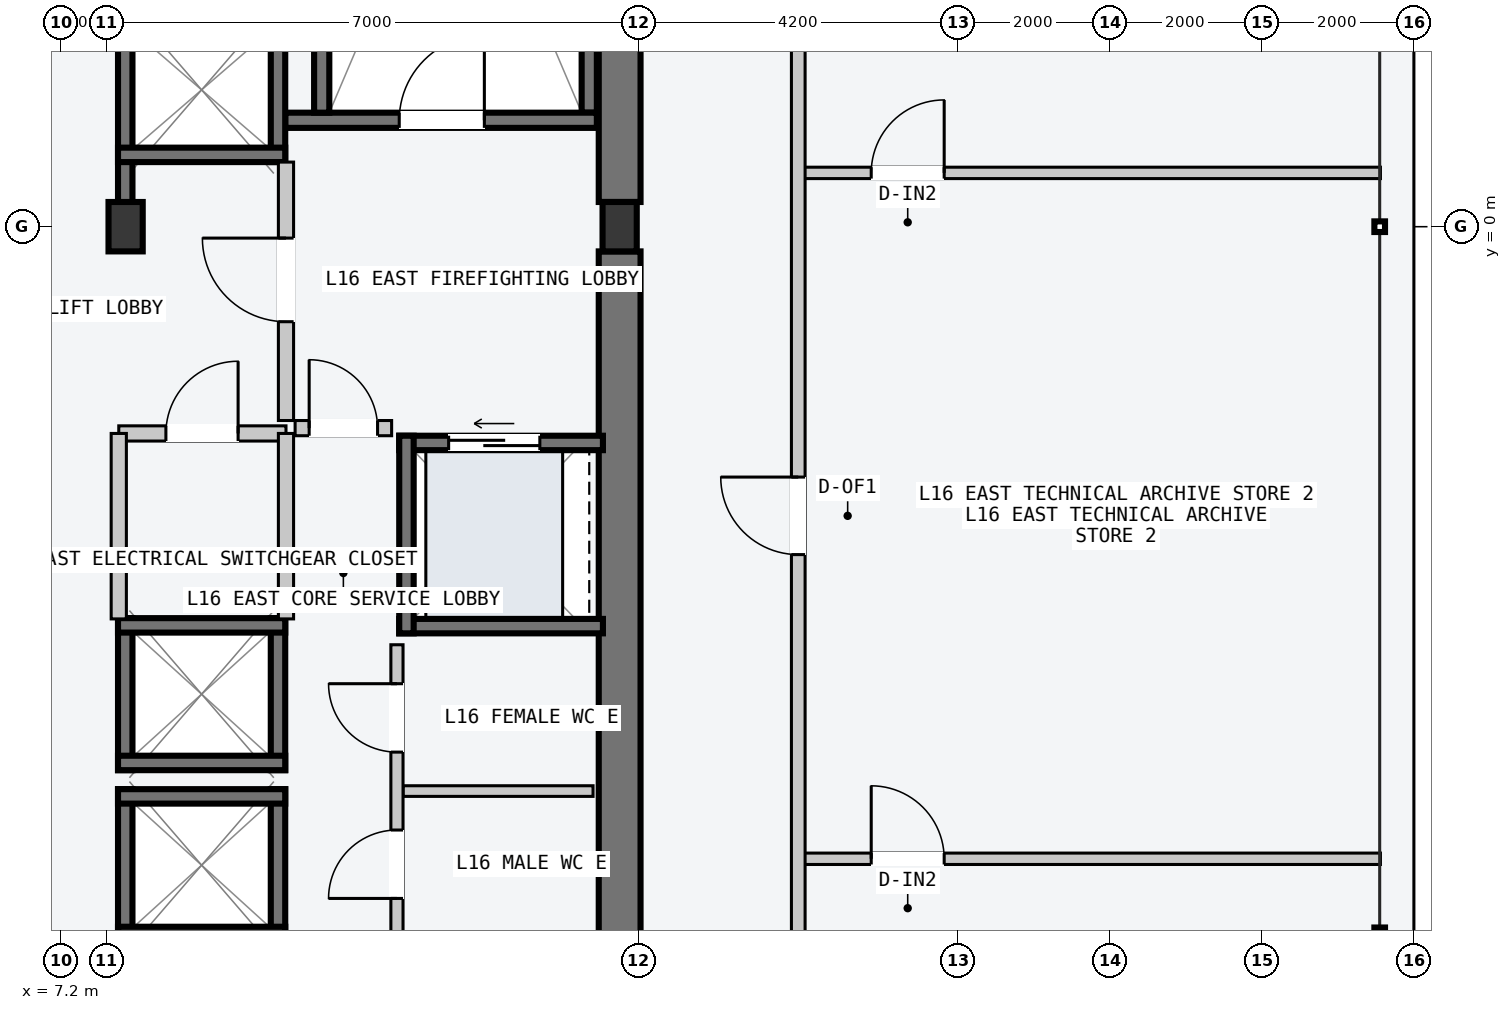
"""IFC4 building model, lengths in metres.
Left out: names, types, materials, properties, quantities, classifications, styles, units other than length and angle.
Written with IfcOpenShell. Run it as: python <this file> out.ifc"""

import sys

from ifc_helpers import new_model, si_unit, direction, frame, frame_2d, origin, origin_2d, place, context, subcontext, project, spatial, rectangle, i_section, extrude, element, fill, save


model = new_model("IFC4")
c1 = context("Model", 3, precision=1e-05, world=origin(), true_north=direction((0.0, 1.0)))
c2 = subcontext(c1, "Body", "Model", "MODEL_VIEW")
j1 = project(units=[si_unit("LENGTHUNIT", "METRE"), si_unit("PLANEANGLEUNIT", "RADIAN")], contexts=[c1])
p1 = place(None, origin())
s1 = spatial("IfcSite", under=j1, at=p1, CompositionType="ELEMENT")
p2 = place(p1, origin())
s2 = spatial("IfcBuilding", under=s1, at=p2, CompositionType="ELEMENT")
p3 = place(p2, frame((0.0, 0.0, 63.6)))
s3 = spatial("IfcBuildingStorey", under=s2, at=p3, CompositionType="ELEMENT", Elevation=63.6)
for number, where, z_axis, x_axis in (
    (1, (14.55, -9.425, -0.2), (0.0, 0.0, 1.0), (0.0, 1.0, 0.0)),
    (2, (14.55, 0.325, -0.2), (0.0, 0.0, 1.0), (0.0, 1.0, 0.0)),
):
    element("IfcWall", number, at=place(p3, frame(where, z_axis=z_axis, x_axis=x_axis)), inside=s3, PredefinedType="SHEAR", context=c2, shape_type="SweptSolid", body=[
        extrude(rectangle(XDim=9.1, YDim=0.55, at=frame_2d((4.55, 0.0))), origin(), (0.0, 0.0, 1.0), 3.6),
    ])
p4 = place(p3, frame((14.15, 1.5, -0.2), z_axis=(0.0, 0.0, 1.0), x_axis=(0.0, 1.0, 0.0)))
e3 = element("IfcWall", 3, at=p4, inside=s3, PredefinedType="SOLIDWALL", context=c2, shape_type="SweptSolid", body=[
    extrude(rectangle(XDim=7.8, YDim=0.2, at=frame_2d((3.9, 0.0))), origin(), (0.0, 0.0, 1.0), 3.6),
])
p5 = place(p3, frame((10.15, 1.4, -0.2), z_axis=(0.0, 0.0, 1.0), x_axis=(1.0, 0.0, 0.0)))
e4 = element("IfcWall", 4, at=p5, inside=s3, PredefinedType="SOLIDWALL", context=c2, shape_type="SweptSolid", body=[
    extrude(rectangle(XDim=4.1, YDim=0.2, at=frame_2d((2.05, 0.0))), origin(), (0.0, 0.0, 1.0), 3.6),
])
p6 = place(p5, frame((1.5, 0.0, 0.2)))
e5 = element("IfcOpeningElement", 5, at=p6, cuts=e4, PredefinedType="OPENING", context=c2, shape_type="SweptSolid", body=[
    extrude(rectangle(XDim=1.12, YDim=2.18, at=frame_2d((0.56, 1.09))), frame((0.0, 0.11, 0.0), z_axis=(0.0, -1.0, 0.0), x_axis=(1.0, 0.0, 0.0)), (0.0, 0.0, 1.0), 0.22),
])
p7 = place(p3, frame((10.63, 1.5, -0.2), z_axis=(0.0, 0.0, 1.0), x_axis=(0.0, 1.0, 0.0)))
e6 = element("IfcWall", 6, at=p7, inside=s3, PredefinedType="SOLIDWALL", context=c2, shape_type="SweptSolid", body=[
    extrude(rectangle(XDim=7.8, YDim=0.2, at=frame_2d((3.9, 0.0))), origin(), (0.0, 0.0, 1.0), 3.6),
])
for number, where, z_axis, x_axis in (
    (7, (8.05, 0.0, 0.0), (0.0, 0.0, 1.0), (1.0, 0.0, 0.0)),
    (8, (14.55, 0.0, 0.0), (0.0, 0.0, 1.0), (1.0, 0.0, 0.0)),
):
    element("IfcColumn", number, at=place(p3, frame(where, z_axis=z_axis, x_axis=x_axis)), inside=s3, PredefinedType="COLUMN", context=c2, shape_type="SweptSolid", body=[
        extrude(i_section(OverallWidth=0.45, OverallDepth=0.65, WebThickness=0.025, FlangeThickness=0.04, at=origin_2d()), origin(), (0.0, 0.0, 1.0), 3.6),
    ])
p8 = place(p3, frame((8.045, 0.21, -0.2), z_axis=(0.0, 0.0, 1.0), x_axis=(0.0, 1.0, 0.0)))
e9 = element("IfcWall", 9, at=p8, inside=s3, PredefinedType="SOLIDWALL", context=c2, shape_type="SweptSolid", body=[
    extrude(rectangle(XDim=2.54, YDim=0.19, at=frame_2d((1.27, 0.0))), origin(), (0.0, 0.0, 1.0), 3.6),
])
p9 = place(p3, frame((10.055, 0.85, -0.2), z_axis=(0.0, 0.0, 1.0), x_axis=(0.0, 1.0, 0.0)))
e10 = element("IfcWall", 10, at=p9, inside=s3, PredefinedType="SOLIDWALL", context=c2, shape_type="SweptSolid", body=[
    extrude(rectangle(XDim=1.9, YDim=0.19, at=frame_2d((0.95, 0.0))), origin(), (0.0, 0.0, 1.0), 3.6),
])
p10 = place(p3, frame((7.95, 0.945, -0.2), z_axis=(0.0, 0.0, 1.0), x_axis=(1.0, 0.0, 0.0)))
e11 = element("IfcWall", 11, at=p10, inside=s3, PredefinedType="SOLIDWALL", context=c2, shape_type="SweptSolid", body=[
    extrude(rectangle(XDim=2.2, YDim=0.19, at=frame_2d((1.1, 0.0))), origin(), (0.0, 0.0, 1.0), 3.6),
])
for number, where, z_axis, x_axis in (
    (12, (8.045, -9.52, -0.2), (0.0, 0.0, 1.0), (0.0, 1.0, 0.0)),
    (13, (10.055, -9.52, -0.2), (0.0, 0.0, 1.0), (0.0, 1.0, 0.0)),
):
    element("IfcWall", number, at=place(p3, frame(where, z_axis=z_axis, x_axis=x_axis)), inside=s3, PredefinedType="SOLIDWALL", context=c2, shape_type="SweptSolid", body=[
        extrude(rectangle(XDim=2.12, YDim=0.19, at=frame_2d((1.06, 0.0))), origin(), (0.0, 0.0, 1.0), 3.6),
    ])
for number, where, z_axis, x_axis in (
    (14, (7.95, -7.495, -0.2), (0.0, 0.0, 1.0), (1.0, 0.0, 0.0)),
    (15, (7.95, -9.305, -0.2), (0.0, 0.0, 1.0), (1.0, 0.0, 0.0)),
):
    element("IfcWall", number, at=place(p3, frame(where, z_axis=z_axis, x_axis=x_axis)), inside=s3, PredefinedType="SOLIDWALL", context=c2, shape_type="SweptSolid", body=[
        extrude(rectangle(XDim=2.2, YDim=0.19, at=frame_2d((1.1, 0.0))), origin(), (0.0, 0.0, 1.0), 3.6),
    ])
for number, where, z_axis, x_axis in (
    (16, (8.045, -7.15, -0.2), (0.0, 0.0, 1.0), (0.0, 1.0, 0.0)),
    (17, (10.055, -7.15, -0.2), (0.0, 0.0, 1.0), (0.0, 1.0, 0.0)),
):
    element("IfcWall", number, at=place(p3, frame(where, z_axis=z_axis, x_axis=x_axis)), inside=s3, PredefinedType="SOLIDWALL", context=c2, shape_type="SweptSolid", body=[
        extrude(rectangle(XDim=2.0, YDim=0.19, at=frame_2d((1.0, 0.0))), origin(), (0.0, 0.0, 1.0), 3.6),
    ])
for number, where, z_axis, x_axis in (
    (18, (7.95, -5.245, -0.2), (0.0, 0.0, 1.0), (1.0, 0.0, 0.0)),
    (19, (7.95, -7.055, -0.2), (0.0, 0.0, 1.0), (1.0, 0.0, 0.0)),
):
    element("IfcWall", number, at=place(p3, frame(where, z_axis=z_axis, x_axis=x_axis)), inside=s3, PredefinedType="SOLIDWALL", context=c2, shape_type="SweptSolid", body=[
        extrude(rectangle(XDim=2.2, YDim=0.19, at=frame_2d((1.1, 0.0))), origin(), (0.0, 0.0, 1.0), 3.6),
    ])
p11 = place(p3, frame((11.65, -2.845, -0.2), z_axis=(0.0, 0.0, 1.0), x_axis=(1.0, 0.0, 0.0)))
e20 = element("IfcWall", 20, at=p11, inside=s3, PredefinedType="SOLIDWALL", context=c2, shape_type="SweptSolid", body=[
    extrude(rectangle(XDim=2.68, YDim=0.19, at=frame_2d((1.34, 0.0))), origin(), (0.0, 0.0, 1.0), 3.6),
])
p12 = place(p11, frame((0.65, 0.0, 0.2)))
e21 = element("IfcOpeningElement", 21, at=p12, cuts=e20, PredefinedType="OPENING", context=c2, shape_type="SweptSolid", body=[
    extrude(rectangle(XDim=1.2, YDim=2.2, at=frame_2d((0.6, 1.1))), frame((0.0, 0.105, 0.0), z_axis=(0.0, -1.0, 0.0), x_axis=(1.0, 0.0, 0.0)), (0.0, 0.0, 1.0), 0.21),
])
p13 = place(p3, frame((11.65, -5.255, -0.2), z_axis=(0.0, 0.0, 1.0), x_axis=(1.0, 0.0, 0.0)))
e22 = element("IfcWall", 22, at=p13, inside=s3, PredefinedType="SOLIDWALL", context=c2, shape_type="SweptSolid", body=[
    extrude(rectangle(XDim=2.68, YDim=0.19, at=frame_2d((1.34, 0.0))), origin(), (0.0, 0.0, 1.0), 3.6),
])
p14 = place(p3, frame((11.745, -5.35, -0.2), z_axis=(0.0, 0.0, 1.0), x_axis=(0.0, 1.0, 0.0)))
e23 = element("IfcWall", 23, at=p14, inside=s3, PredefinedType="SOLIDWALL", context=c2, shape_type="SweptSolid", body=[
    extrude(rectangle(XDim=2.6, YDim=0.19, at=frame_2d((1.3, 0.0))), origin(), (0.0, 0.0, 1.0), 3.6),
])
p15 = place(p3, frame((10.16, -2.55, 0.0), z_axis=(0.0, 0.0, 1.0), x_axis=(0.0, 1.0, 0.0)))
e24 = element("IfcWall", 24, at=p15, inside=s3, PredefinedType="PARTITIONING", context=c2, shape_type="SweptSolid", body=[
    extrude(rectangle(XDim=3.4, YDim=0.2, at=frame_2d((1.7, 0.0))), origin(), (0.0, 0.0, 1.0), 3.4),
])
p16 = place(p15, frame((1.3, 0.0, 0.0)))
e25 = element("IfcOpeningElement", 25, at=p16, cuts=e24, PredefinedType="OPENING", context=c2, shape_type="SweptSolid", body=[
    extrude(rectangle(XDim=1.1, YDim=2.15, at=frame_2d((0.55, 1.075))), frame((0.0, 0.11, 0.0), z_axis=(0.0, -1.0, 0.0), x_axis=(1.0, 0.0, 0.0)), (0.0, 0.0, 1.0), 0.22),
])
p17 = place(p3, frame((10.28, -2.65, 0.0), z_axis=(0.0, 0.0, 1.0), x_axis=(1.0, 0.0, 0.0)))
e26 = element("IfcWall", 26, at=p17, inside=s3, PredefinedType="PARTITIONING", context=c2, shape_type="SweptSolid", body=[
    extrude(rectangle(XDim=1.27, YDim=0.2, at=frame_2d((0.635, 0.0))), origin(), (0.0, 0.0, 1.0), 3.4),
])
p18 = place(p17, frame((0.185, 0.0, 0.0)))
e27 = element("IfcOpeningElement", 27, at=p18, cuts=e26, PredefinedType="OPENING", context=c2, shape_type="SweptSolid", body=[
    extrude(rectangle(XDim=0.9, YDim=2.15, at=frame_2d((0.45, 1.075))), frame((0.0, 0.11, 0.0), z_axis=(0.0, -1.0, 0.0), x_axis=(1.0, 0.0, 0.0)), (0.0, 0.0, 1.0), 0.22),
])
p19 = place(p3, frame((7.96, -2.72, 0.0), z_axis=(0.0, 0.0, 1.0), x_axis=(1.0, 0.0, 0.0)))
e28 = element("IfcWall", 28, at=p19, inside=s3, PredefinedType="PARTITIONING", context=c2, shape_type="SweptSolid", body=[
    extrude(rectangle(XDim=2.2, YDim=0.2, at=frame_2d((1.1, 0.0))), origin(), (0.0, 0.0, 1.0), 3.4),
])
p20 = place(p19, frame((0.62, 0.0, 0.0)))
e29 = element("IfcOpeningElement", 29, at=p20, cuts=e28, PredefinedType="OPENING", context=c2, shape_type="SweptSolid", body=[
    extrude(rectangle(XDim=0.95, YDim=2.1, at=frame_2d((0.475, 1.05))), frame((0.0, 0.11, 0.0), z_axis=(0.0, -1.0, 0.0), x_axis=(1.0, 0.0, 0.0)), (0.0, 0.0, 1.0), 0.22),
])
for number, where, z_axis, x_axis in (
    (30, (7.96, -5.16, 0.0), (0.0, 0.0, 1.0), (0.0, 1.0, 0.0)),
    (31, (10.16, -5.16, 0.0), (0.0, 0.0, 1.0), (0.0, 1.0, 0.0)),
):
    element("IfcWall", number, at=place(p3, frame(where, z_axis=z_axis, x_axis=x_axis)), inside=s3, PredefinedType="PARTITIONING", context=c2, shape_type="SweptSolid", body=[
        extrude(rectangle(XDim=2.44, YDim=0.2, at=frame_2d((1.22, 0.0))), origin(), (0.0, 0.0, 1.0), 3.4),
    ])
p21 = place(p3, frame((11.7, -7.425, 0.0), z_axis=(0.0, 0.0, 1.0), x_axis=(1.0, 0.0, 0.0)))
e32 = element("IfcWall", 32, at=p21, inside=s3, PredefinedType="PARTITIONING", context=c2, shape_type="SweptSolid", body=[
    extrude(rectangle(XDim=2.5, YDim=0.14, at=frame_2d((1.25, 0.0))), origin(), (0.0, 0.0, 1.0), 3.4),
])
p22 = place(p3, frame((11.62, -9.35, 0.0), z_axis=(0.0, 0.0, 1.0), x_axis=(0.0, 1.0, 0.0)))
e33 = element("IfcWall", 33, at=p22, inside=s3, PredefinedType="PARTITIONING", context=c2, shape_type="SweptSolid", body=[
    extrude(rectangle(XDim=3.85, YDim=0.16, at=frame_2d((1.925, 0.0))), origin(), (0.0, 0.0, 1.0), 3.4),
])
p23 = place(p22, frame((0.512, 0.0, 0.0)))
e34 = element("IfcOpeningElement", 34, at=p23, cuts=e33, PredefinedType="OPENING", context=c2, shape_type="SweptSolid", body=[
    extrude(rectangle(XDim=0.9, YDim=2.15, at=frame_2d((0.45, 1.075))), frame((0.0, 0.09, 0.0), z_axis=(0.0, -1.0, 0.0), x_axis=(1.0, 0.0, 0.0)), (0.0, 0.0, 1.0), 0.18),
])
p24 = place(p22, frame((2.438, 0.0, 0.0)))
e35 = element("IfcOpeningElement", 35, at=p24, cuts=e33, PredefinedType="OPENING", context=c2, shape_type="SweptSolid", body=[
    extrude(rectangle(XDim=0.9, YDim=2.15, at=frame_2d((0.45, 1.075))), frame((0.0, 0.09, 0.0), z_axis=(0.0, -1.0, 0.0), x_axis=(1.0, 0.0, 0.0)), (0.0, 0.0, 1.0), 0.18),
])
p25 = place(p3, frame((16.96, -8.316, 0.0), z_axis=(0.0, 0.0, 1.0), x_axis=(1.0, 0.0, 0.0)))
e36 = element("IfcWall", 36, at=p25, inside=s3, PredefinedType="PARTITIONING", context=c2, shape_type="SweptSolid", body=[
    extrude(rectangle(XDim=7.6, YDim=0.15, at=frame_2d((3.8, 0.0))), origin(), (0.0, 0.0, 1.0), 3.4),
])
p26 = place(p25, frame((0.9, 0.0, 0.0)))
e37 = element("IfcOpeningElement", 37, at=p26, cuts=e36, PredefinedType="OPENING", context=c2, shape_type="SweptSolid", body=[
    extrude(rectangle(XDim=0.96, YDim=2.18, at=frame_2d((0.48, 1.09))), frame((0.0, 0.085, 0.0), z_axis=(0.0, -1.0, 0.0), x_axis=(1.0, 0.0, 0.0)), (0.0, 0.0, 1.0), 0.17),
])
p27 = place(p3, frame((16.96, 0.708, 0.0), z_axis=(0.0, 0.0, 1.0), x_axis=(1.0, 0.0, 0.0)))
e38 = element("IfcWall", 38, at=p27, inside=s3, PredefinedType="PARTITIONING", context=c2, shape_type="SweptSolid", body=[
    extrude(rectangle(XDim=7.6, YDim=0.15, at=frame_2d((3.8, 0.0))), origin(), (0.0, 0.0, 1.0), 3.4),
])
p28 = place(p27, frame((0.9, 0.0, 0.0)))
e39 = element("IfcOpeningElement", 39, at=p28, cuts=e38, PredefinedType="OPENING", context=c2, shape_type="SweptSolid", body=[
    extrude(rectangle(XDim=0.96, YDim=2.18, at=frame_2d((0.48, 1.09))), frame((0.0, 0.085, 0.0), z_axis=(0.0, -1.0, 0.0), x_axis=(1.0, 0.0, 0.0)), (0.0, 0.0, 1.0), 0.17),
])
p29 = place(p3, frame((16.9, -14.42, 0.0), z_axis=(0.0, 0.0, 1.0), x_axis=(0.0, 1.0, 0.0)))
e40 = element("IfcWall", 40, at=p29, inside=s3, PredefinedType="PARTITIONING", context=c2, shape_type="SweptSolid", body=[
    extrude(rectangle(XDim=26.54, YDim=0.18, at=frame_2d((13.27, 0.0))), origin(), (0.0, 0.0, 1.0), 3.4),
])
p30 = place(p29, frame((2.572, 0.0, 0.0)))
e41 = element("IfcOpeningElement", 41, at=p30, cuts=e40, PredefinedType="OPENING", context=c2, shape_type="SweptSolid", body=[
    extrude(rectangle(XDim=0.96, YDim=2.18, at=frame_2d((0.48, 1.09))), frame((0.0, 0.1, 0.0), z_axis=(0.0, -1.0, 0.0), x_axis=(1.0, 0.0, 0.0)), (0.0, 0.0, 1.0), 0.2),
])
p31 = place(p29, frame((10.106, 0.0, 0.0)))
e42 = element("IfcOpeningElement", 42, at=p31, cuts=e40, PredefinedType="OPENING", context=c2, shape_type="SweptSolid", body=[
    extrude(rectangle(XDim=1.02, YDim=2.2, at=frame_2d((0.51, 1.1))), frame((0.0, 0.1, 0.0), z_axis=(0.0, -1.0, 0.0), x_axis=(1.0, 0.0, 0.0)), (0.0, 0.0, 1.0), 0.2),
])
p32 = place(p29, frame((20.304, 0.0, 0.0)))
e43 = element("IfcOpeningElement", 43, at=p32, cuts=e40, PredefinedType="OPENING", context=c2, shape_type="SweptSolid", body=[
    extrude(rectangle(XDim=1.06, YDim=2.2, at=frame_2d((0.53, 1.1))), frame((0.0, 0.1, 0.0), z_axis=(0.0, -1.0, 0.0), x_axis=(1.0, 0.0, 0.0)), (0.0, 0.0, 1.0), 0.2),
])
p33 = place(p6, origin())
e44 = element("IfcDoor", 44, at=p33, inside=s3, OperationType="SINGLE_SWING_RIGHT", PredefinedType="DOOR", context=c2, shape_type="SweptSolid", body=[
    extrude(rectangle(XDim=1.12, YDim=2.18, at=frame_2d((0.56, 1.09))), frame((0.0, 0.025, 0.0), z_axis=(0.0, -1.0, 0.0), x_axis=(1.0, 0.0, 0.0)), (0.0, 0.0, 1.0), 0.05),
])
fill(e5, e44)
p34 = place(p12, origin())
e45 = element("IfcDoor", 45, at=p34, inside=s3, OperationType="SLIDING_TO_LEFT", PredefinedType="DOOR", context=c2, shape_type="SweptSolid", body=[
    extrude(rectangle(XDim=1.2, YDim=2.2, at=frame_2d((0.6, 1.1))), frame((0.0, 0.025, 0.0), z_axis=(0.0, -1.0, 0.0), x_axis=(1.0, 0.0, 0.0)), (0.0, 0.0, 1.0), 0.05),
])
fill(e21, e45)
p35 = place(p16, origin())
e46 = element("IfcDoor", 46, at=p35, inside=s3, OperationType="SINGLE_SWING_RIGHT", PredefinedType="DOOR", context=c2, shape_type="SweptSolid", body=[
    extrude(rectangle(XDim=1.1, YDim=2.15, at=frame_2d((0.55, 1.075))), frame((0.0, 0.025, 0.0), z_axis=(0.0, -1.0, 0.0), x_axis=(1.0, 0.0, 0.0)), (0.0, 0.0, 1.0), 0.05),
])
fill(e25, e46)
p36 = place(p18, origin())
e47 = element("IfcDoor", 47, at=p36, inside=s3, OperationType="SINGLE_SWING_LEFT", PredefinedType="DOOR", context=c2, shape_type="SweptSolid", body=[
    extrude(rectangle(XDim=0.9, YDim=2.15, at=frame_2d((0.45, 1.075))), frame((0.0, 0.025, 0.0), z_axis=(0.0, -1.0, 0.0), x_axis=(1.0, 0.0, 0.0)), (0.0, 0.0, 1.0), 0.05),
])
fill(e27, e47)
p37 = place(p20, origin())
e48 = element("IfcDoor", 48, at=p37, inside=s3, OperationType="SINGLE_SWING_RIGHT", PredefinedType="DOOR", context=c2, shape_type="SweptSolid", body=[
    extrude(rectangle(XDim=0.95, YDim=2.1, at=frame_2d((0.475, 1.05))), frame((0.0, 0.025, 0.0), z_axis=(0.0, -1.0, 0.0), x_axis=(1.0, 0.0, 0.0)), (0.0, 0.0, 1.0), 0.05),
])
fill(e29, e48)
p38 = place(p23, origin())
e49 = element("IfcDoor", 49, at=p38, inside=s3, OperationType="SINGLE_SWING_LEFT", PredefinedType="DOOR", context=c2, shape_type="SweptSolid", body=[
    extrude(rectangle(XDim=0.9, YDim=2.15, at=frame_2d((0.45, 1.075))), frame((0.0, 0.025, 0.0), z_axis=(0.0, -1.0, 0.0), x_axis=(1.0, 0.0, 0.0)), (0.0, 0.0, 1.0), 0.05),
])
fill(e34, e49)
p39 = place(p24, origin())
e50 = element("IfcDoor", 50, at=p39, inside=s3, OperationType="SINGLE_SWING_RIGHT", PredefinedType="DOOR", context=c2, shape_type="SweptSolid", body=[
    extrude(rectangle(XDim=0.9, YDim=2.15, at=frame_2d((0.45, 1.075))), frame((0.0, 0.025, 0.0), z_axis=(0.0, -1.0, 0.0), x_axis=(1.0, 0.0, 0.0)), (0.0, 0.0, 1.0), 0.05),
])
fill(e35, e50)
p40 = place(p26, origin())
e51 = element("IfcDoor", 51, at=p40, inside=s3, OperationType="SINGLE_SWING_LEFT", PredefinedType="DOOR", context=c2, shape_type="SweptSolid", body=[
    extrude(rectangle(XDim=0.96, YDim=2.18, at=frame_2d((0.48, 1.09))), frame((0.0, 0.025, 0.0), z_axis=(0.0, -1.0, 0.0), x_axis=(1.0, 0.0, 0.0)), (0.0, 0.0, 1.0), 0.05),
])
fill(e37, e51)
p41 = place(p28, origin())
e52 = element("IfcDoor", 52, at=p41, inside=s3, OperationType="SINGLE_SWING_RIGHT", PredefinedType="DOOR", context=c2, shape_type="SweptSolid", body=[
    extrude(rectangle(XDim=0.96, YDim=2.18, at=frame_2d((0.48, 1.09))), frame((0.0, 0.025, 0.0), z_axis=(0.0, -1.0, 0.0), x_axis=(1.0, 0.0, 0.0)), (0.0, 0.0, 1.0), 0.05),
])
fill(e39, e52)
p42 = place(p31, origin())
e53 = element("IfcDoor", 53, at=p42, inside=s3, OperationType="SINGLE_SWING_RIGHT", PredefinedType="DOOR", context=c2, shape_type="SweptSolid", body=[
    extrude(rectangle(XDim=1.02, YDim=2.2, at=frame_2d((0.51, 1.1))), frame((0.0, 0.025, 0.0), z_axis=(0.0, -1.0, 0.0), x_axis=(1.0, 0.0, 0.0)), (0.0, 0.0, 1.0), 0.05),
])
fill(e42, e53)
save(model, sys.argv[1])
